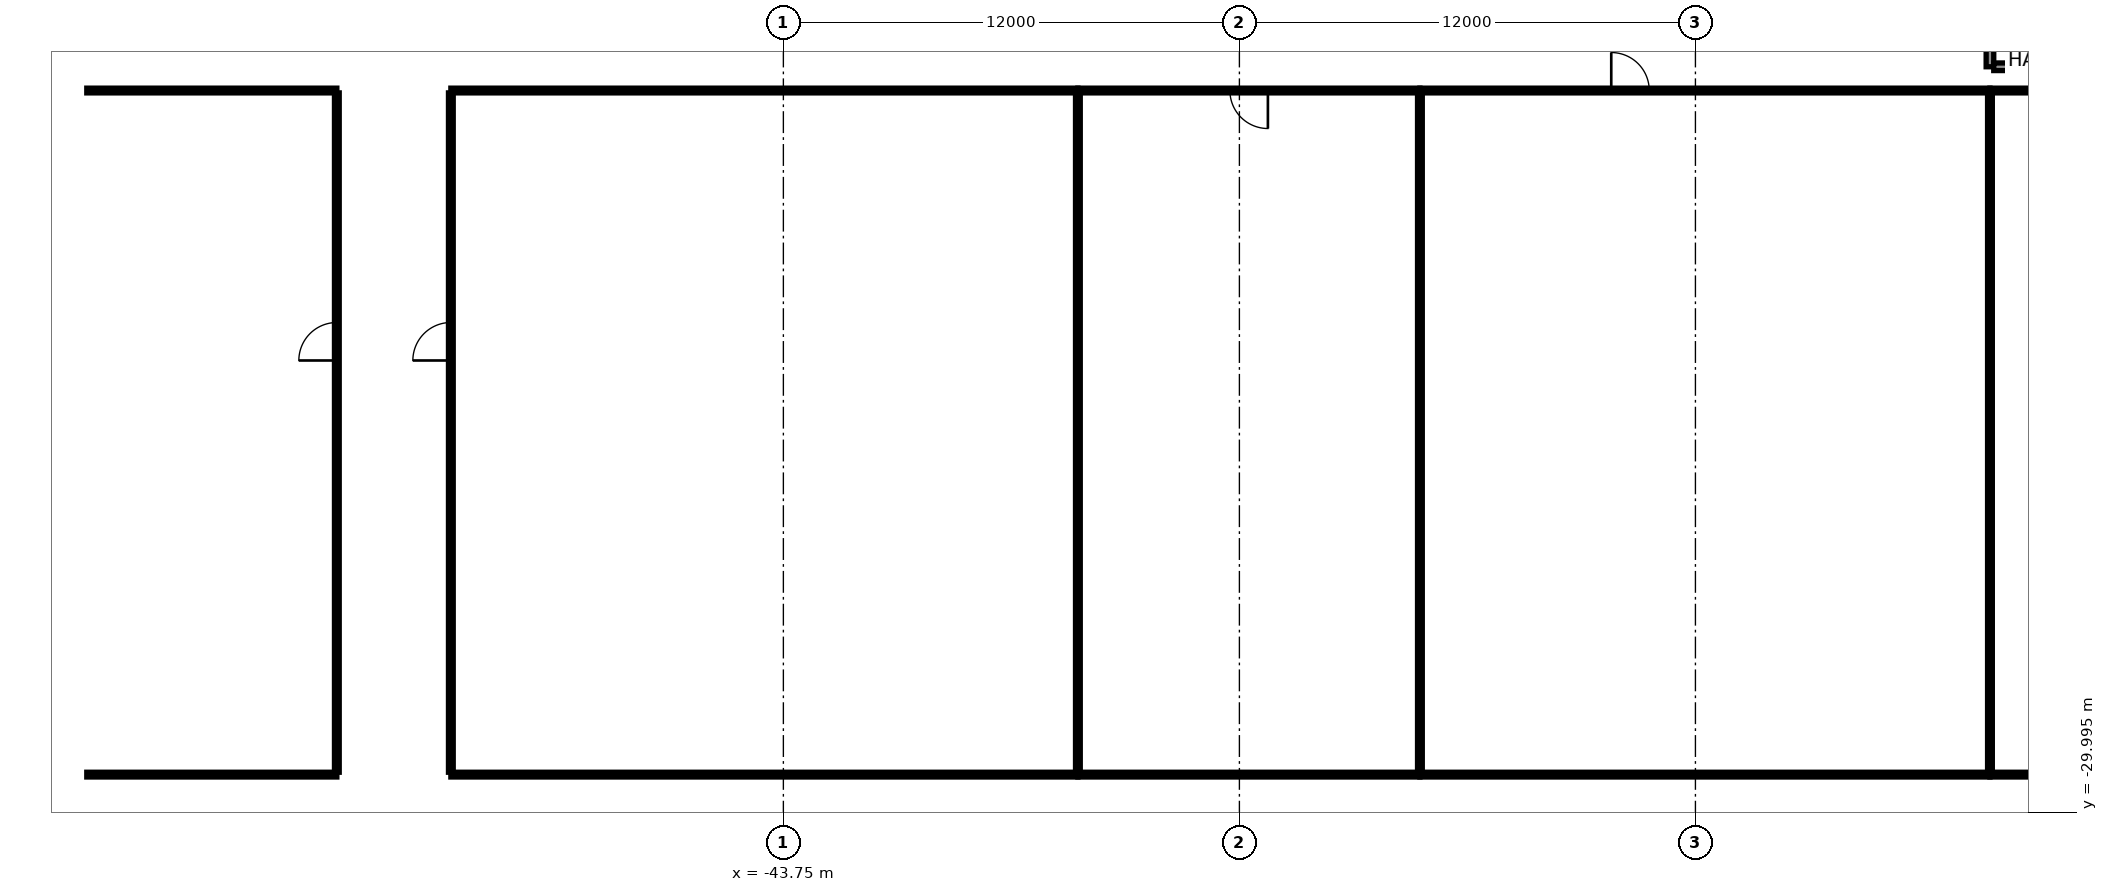
"""IFC4 building model, lengths in metres.
Left out: names, types, materials, properties, quantities, classifications, styles, units other than length and angle.
Written with IfcOpenShell. Run it as: python <this file> out.ifc"""

import sys

from ifc_helpers import new_model, si_unit, direction, frame, frame_2d, origin, origin_2d, place, context, subcontext, project, spatial, rectangle, hollow_rectangle, circle, extrude, element, fill, save


model = new_model("IFC4")
c1 = context("Model", 3, precision=1e-05, world=origin(), true_north=direction((0.0, 1.0)))
c2 = subcontext(c1, "Body", "Model", "MODEL_VIEW")
j1 = project(units=[si_unit("LENGTHUNIT", "METRE"), si_unit("PLANEANGLEUNIT", "RADIAN")], contexts=[c1])
p1 = place(None, origin())
s1 = spatial("IfcSite", under=j1, at=p1, CompositionType="ELEMENT")
p2 = place(p1, origin())
s2 = spatial("IfcBuilding", under=s1, at=p2, CompositionType="ELEMENT")
p3 = place(p2, frame((0.0, 0.0, 7.0)))
s3 = spatial("IfcBuildingStorey", under=s2, at=p3, CompositionType="ELEMENT", Elevation=7.0)
for number, where, z_axis, x_axis in (
    (1, (-59.4, -26.0, 0.0), (0.0, 0.0, 1.0), (1.0, 0.0, 0.0)),
    (2, (-59.4, -12.6, 0.0), (0.0, 0.0, 1.0), (1.0, 0.0, 0.0)),
    (3, (-54.6, -26.0, 0.0), (0.0, 0.0, 1.0), (1.0, 0.0, 0.0)),
    (4, (-54.6, -12.6, 0.0), (0.0, 0.0, 1.0), (1.0, 0.0, 0.0)),
    (5, (-37.8, -26.0, 0.0), (0.0, 0.0, 1.0), (1.0, 0.0, 0.0)),
    (6, (-21.0, -26.0, 0.0), (0.0, 0.0, 1.0), (1.0, 0.0, 0.0)),
):
    element("IfcColumn", number, at=place(p3, frame(where, z_axis=z_axis, x_axis=x_axis)), inside=s3, PredefinedType="COLUMN", context=c2, shape_type="SweptSolid", body=[
        extrude(circle(Radius=0.6, at=origin_2d()), origin(), (0.0, 0.0, 1.0), 5.0),
    ])
for number, where, z_axis, x_axis in (
    (7, (-42.961, -19.418, 0.0), (0.0, 0.0, 1.0), (-0.5, -0.866, 0.0)),
    (8, (-31.75, -21.904, 0.0), (0.0, 0.0, 1.0), (0.0, -1.0, 0.0)),
    (9, (-20.539, -19.418, 0.0), (0.0, 0.0, 1.0), (0.5, -0.866, 0.0)),
    (10, (-11.317, -11.797, 0.0), (0.0, 0.0, 1.0), (0.866, -0.5, 0.0)),
):
    element("IfcColumn", number, at=place(p3, frame(where, z_axis=z_axis, x_axis=x_axis)), inside=s3, PredefinedType="COLUMN", context=c2, shape_type="SweptSolid", body=[
        extrude(hollow_rectangle(XDim=1.5, YDim=1.5, WallThickness=0.07, at=origin_2d()), origin(), (0.0, 0.0, 1.0), 5.0),
    ])
p4 = place(p3, frame((-12.0, -6.525, 0.0), z_axis=(0.0, 0.0, 1.0), x_axis=(0.0, -1.0, 0.0)))
e11 = element("IfcWall", 11, at=p4, inside=s3, PredefinedType="SOLIDWALL", context=c2, shape_type="SweptSolid", body=[
    extrude(rectangle(XDim=3.85, YDim=0.2, at=frame_2d((1.925, 0.0))), origin(), (0.0, 0.0, 1.0), 4.7),
])
p5 = place(p4, frame((1.275, 0.0, 0.0)))
e12 = element("IfcOpeningElement", 12, at=p5, cuts=e11, PredefinedType="OPENING", context=c2, shape_type="SweptSolid", body=[
    extrude(rectangle(XDim=1.2, YDim=2.1, at=frame_2d((0.6, 1.05))), frame((0.0, 0.11, 0.0), z_axis=(0.0, -1.0, 0.0), x_axis=(1.0, 0.0, 0.0)), (0.0, 0.0, 1.0), 0.22),
])
p6 = place(p3, frame((-11.9, -10.375, 0.0), z_axis=(0.0, 0.0, 1.0), x_axis=(1.0, 0.0, 0.0)))
e13 = element("IfcWall", 13, at=p6, inside=s3, PredefinedType="SOLIDWALL", context=c2, shape_type="SweptSolid", body=[
    extrude(rectangle(XDim=7.0, YDim=0.2, at=frame_2d((3.5, 0.0))), origin(), (0.0, 0.0, 1.0), 4.7),
])
p7 = place(p3, frame((-62.08, -11.0, 0.0), z_axis=(0.0, 0.0, 1.0), x_axis=(1.0, 0.0, 0.0)))
e14 = element("IfcWall", 14, at=p7, inside=s3, PredefinedType="PARTITIONING", context=c2, shape_type="SweptSolid", body=[
    extrude(rectangle(XDim=6.58, YDim=0.125, at=frame_2d((3.29, 0.0))), origin(), (0.0, 0.0, 1.0), 3.762),
])
p8 = place(p3, frame((-52.5, -11.0, 0.0), z_axis=(0.0, 0.0, 1.0), x_axis=(1.0, 0.0, 0.0)))
e15 = element("IfcWall", 15, at=p8, inside=s3, PredefinedType="PARTITIONING", context=c2, shape_type="SweptSolid", body=[
    extrude(rectangle(XDim=16.5, YDim=0.125, at=frame_2d((8.25, 0.0))), origin(), (0.0, 0.0, 1.0), 3.996),
])
p9 = place(p3, frame((-36.0, -11.0, 0.0), z_axis=(0.0, 0.0, 1.0), x_axis=(1.0, 0.0, 0.0)))
e16 = element("IfcWall", 16, at=p9, inside=s3, PredefinedType="PARTITIONING", context=c2, shape_type="SweptSolid", body=[
    extrude(rectangle(XDim=9.0, YDim=0.125, at=frame_2d((4.5, 0.0))), origin(), (0.0, 0.0, 1.0), 3.996),
])
p10 = place(p9, frame((4.0, 0.0, 0.0)))
e17 = element("IfcOpeningElement", 17, at=p10, cuts=e16, PredefinedType="OPENING", context=c2, shape_type="SweptSolid", body=[
    extrude(rectangle(XDim=1.0, YDim=2.1, at=frame_2d((0.5, 1.05))), frame((0.0, 0.073, 0.0), z_axis=(0.0, -1.0, 0.0), x_axis=(1.0, 0.0, 0.0)), (0.0, 0.0, 1.0), 0.145),
])
p11 = place(p3, frame((-27.0, -11.0, 0.0), z_axis=(0.0, 0.0, 1.0), x_axis=(1.0, 0.0, 0.0)))
e18 = element("IfcWall", 18, at=p11, inside=s3, PredefinedType="PARTITIONING", context=c2, shape_type="SweptSolid", body=[
    extrude(rectangle(XDim=15.0, YDim=0.125, at=frame_2d((7.5, 0.0))), origin(), (0.0, 0.0, 1.0), 3.996),
])
p12 = place(p11, frame((5.035, 0.0, 0.0)))
e19 = element("IfcOpeningElement", 19, at=p12, cuts=e18, PredefinedType="OPENING", context=c2, shape_type="SweptSolid", body=[
    extrude(rectangle(XDim=1.0, YDim=2.1, at=frame_2d((0.5, 1.05))), frame((0.0, 0.073, 0.0), z_axis=(0.0, -1.0, 0.0), x_axis=(1.0, 0.0, 0.0)), (0.0, 0.0, 1.0), 0.145),
])
p13 = place(p3, frame((-12.0, -11.0, 0.0), z_axis=(0.0, 0.0, 1.0), x_axis=(1.0, 0.0, 0.0)))
e20 = element("IfcWall", 20, at=p13, inside=s3, PredefinedType="PARTITIONING", context=c2, shape_type="SweptSolid", body=[
    extrude(rectangle(XDim=10.5, YDim=0.125, at=frame_2d((5.25, 0.0))), origin(), (0.0, 0.0, 1.0), 4.7),
])
p14 = place(p3, frame((-55.5, -29.0, 0.0), z_axis=(0.0, 0.0, 1.0), x_axis=(-1.0, 0.0, 0.0)))
e21 = element("IfcWall", 21, at=p14, inside=s3, PredefinedType="PARTITIONING", context=c2, shape_type="SweptSolid", body=[
    extrude(rectangle(XDim=6.58, YDim=0.125, at=frame_2d((3.29, 0.0))), origin(), (0.0, 0.0, 1.0), 3.762),
])
p15 = place(p3, frame((-36.0, -29.0, 0.0), z_axis=(0.0, 0.0, 1.0), x_axis=(-1.0, 0.0, 0.0)))
e22 = element("IfcWall", 22, at=p15, inside=s3, PredefinedType="PARTITIONING", context=c2, shape_type="SweptSolid", body=[
    extrude(rectangle(XDim=16.5, YDim=0.125, at=frame_2d((8.25, 0.0))), origin(), (0.0, 0.0, 1.0), 3.762),
])
p16 = place(p3, frame((-27.0, -29.0, 0.0), z_axis=(0.0, 0.0, 1.0), x_axis=(-1.0, 0.0, 0.0)))
e23 = element("IfcWall", 23, at=p16, inside=s3, PredefinedType="PARTITIONING", context=c2, shape_type="SweptSolid", body=[
    extrude(rectangle(XDim=9.0, YDim=0.125, at=frame_2d((4.5, 0.0))), origin(), (0.0, 0.0, 1.0), 3.762),
])
p17 = place(p3, frame((-12.0, -29.0, 0.0), z_axis=(0.0, 0.0, 1.0), x_axis=(-1.0, 0.0, 0.0)))
e24 = element("IfcWall", 24, at=p17, inside=s3, PredefinedType="PARTITIONING", context=c2, shape_type="SweptSolid", body=[
    extrude(rectangle(XDim=15.0, YDim=0.125, at=frame_2d((7.5, 0.0))), origin(), (0.0, 0.0, 1.0), 3.762),
])
p18 = place(p3, frame((-1.5, -29.0, 0.0), z_axis=(0.0, 0.0, 1.0), x_axis=(-1.0, 0.0, 0.0)))
e25 = element("IfcWall", 25, at=p18, inside=s3, PredefinedType="PARTITIONING", context=c2, shape_type="SweptSolid", body=[
    extrude(rectangle(XDim=10.5, YDim=0.125, at=frame_2d((5.25, 0.0))), origin(), (0.0, 0.0, 1.0), 3.762),
])
p19 = place(p3, frame((-55.5, -11.062, 0.0), z_axis=(0.0, 0.0, 1.0), x_axis=(0.0, -1.0, 0.0)))
e26 = element("IfcWall", 26, at=p19, inside=s3, PredefinedType="PARTITIONING", context=c2, shape_type="SweptSolid", body=[
    extrude(rectangle(XDim=17.875, YDim=0.125, at=frame_2d((8.938, 0.0))), origin(), (0.0, 0.0, 1.0), 3.48),
])
p20 = place(p19, frame((6.041, 0.0, 0.0)))
e27 = element("IfcOpeningElement", 27, at=p20, cuts=e26, PredefinedType="OPENING", context=c2, shape_type="SweptSolid", body=[
    extrude(rectangle(XDim=1.0, YDim=2.1, at=frame_2d((0.5, 1.05))), frame((0.0, 0.073, 0.0), z_axis=(0.0, -1.0, 0.0), x_axis=(1.0, 0.0, 0.0)), (0.0, 0.0, 1.0), 0.145),
])
p21 = place(p3, frame((-52.5, -28.938, 0.0), z_axis=(0.0, 0.0, 1.0), x_axis=(0.0, 1.0, 0.0)))
e28 = element("IfcWall", 28, at=p21, inside=s3, PredefinedType="PARTITIONING", context=c2, shape_type="SweptSolid", body=[
    extrude(rectangle(XDim=17.875, YDim=0.125, at=frame_2d((8.938, 0.0))), origin(), (0.0, 0.0, 1.0), 3.48),
])
p22 = place(p21, frame((10.834, 0.0, 0.0)))
e29 = element("IfcOpeningElement", 29, at=p22, cuts=e28, PredefinedType="OPENING", context=c2, shape_type="SweptSolid", body=[
    extrude(rectangle(XDim=1.0, YDim=2.1, at=frame_2d((0.5, 1.05))), frame((0.0, 0.073, 0.0), z_axis=(0.0, -1.0, 0.0), x_axis=(1.0, 0.0, 0.0)), (0.0, 0.0, 1.0), 0.145),
])
for number, where, z_axis, x_axis in (
    (30, (-36.0, -28.938, 0.0), (0.0, 0.0, 1.0), (0.0, 1.0, 0.0)),
    (31, (-27.0, -28.938, 0.0), (0.0, 0.0, 1.0), (0.0, 1.0, 0.0)),
    (32, (-12.0, -28.938, 0.0), (0.0, 0.0, 1.0), (0.0, 1.0, 0.0)),
):
    element("IfcWall", number, at=place(p3, frame(where, z_axis=z_axis, x_axis=x_axis)), inside=s3, PredefinedType="PARTITIONING", context=c2, shape_type="SweptSolid", body=[
        extrude(rectangle(XDim=17.875, YDim=0.125, at=frame_2d((8.938, 0.0))), origin(), (0.0, 0.0, 1.0), 3.48),
    ])
p23 = place(p20, origin())
e33 = element("IfcDoor", 33, at=p23, inside=s3, OperationType="SINGLE_SWING_RIGHT", PredefinedType="DOOR", context=c2, shape_type="SweptSolid", body=[
    extrude(rectangle(XDim=1.0, YDim=2.1, at=frame_2d((0.5, 1.05))), frame((0.0, 0.025, 0.0), z_axis=(0.0, -1.0, 0.0), x_axis=(1.0, 0.0, 0.0)), (0.0, 0.0, 1.0), 0.05),
])
fill(e27, e33)
p24 = place(p22, origin())
e34 = element("IfcDoor", 34, at=p24, inside=s3, OperationType="SINGLE_SWING_LEFT", PredefinedType="DOOR", context=c2, shape_type="SweptSolid", body=[
    extrude(rectangle(XDim=1.0, YDim=2.1, at=frame_2d((0.5, 1.05))), frame((0.0, 0.025, 0.0), z_axis=(0.0, -1.0, 0.0), x_axis=(1.0, 0.0, 0.0)), (0.0, 0.0, 1.0), 0.05),
])
fill(e29, e34)
p25 = place(p10, origin())
e35 = element("IfcDoor", 35, at=p25, inside=s3, OperationType="SINGLE_SWING_RIGHT", PredefinedType="DOOR", context=c2, shape_type="SweptSolid", body=[
    extrude(rectangle(XDim=1.0, YDim=2.1, at=frame_2d((0.5, 1.05))), frame((0.0, 0.025, 0.0), z_axis=(0.0, -1.0, 0.0), x_axis=(1.0, 0.0, 0.0)), (0.0, 0.0, 1.0), 0.05),
])
fill(e17, e35)
p26 = place(p12, origin())
e36 = element("IfcDoor", 36, at=p26, inside=s3, OperationType="SINGLE_SWING_LEFT", PredefinedType="DOOR", context=c2, shape_type="SweptSolid", body=[
    extrude(rectangle(XDim=1.0, YDim=2.1, at=frame_2d((0.5, 1.05))), frame((0.0, 0.025, 0.0), z_axis=(0.0, -1.0, 0.0), x_axis=(1.0, 0.0, 0.0)), (0.0, 0.0, 1.0), 0.05),
])
fill(e19, e36)
save(model, sys.argv[1])
